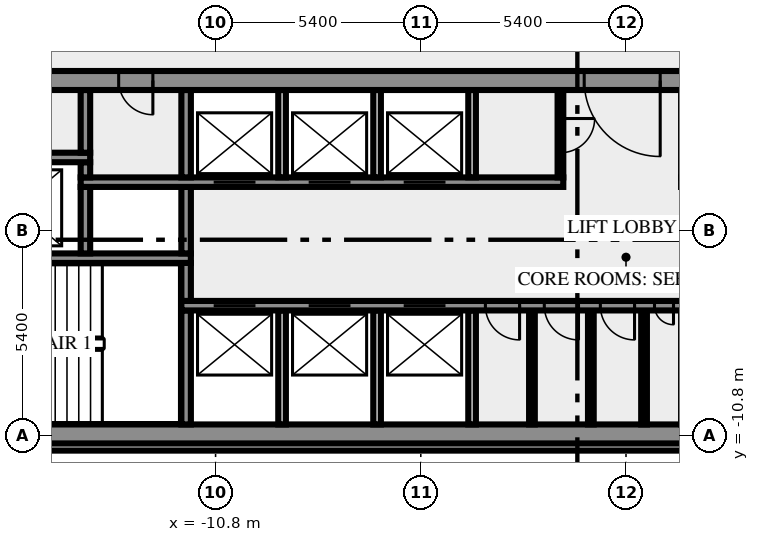
"""IFC4 building model, lengths in metres.
Left out: names, types, materials, properties, quantities, classifications, styles, units other than length and angle.
Written with IfcOpenShell. Run it as: python <this file> out.ifc"""

import sys

from ifc_helpers import new_model, si_unit, direction, frame, frame_2d, origin, place, context, subcontext, project, spatial, rectangle, extrude, element, fill, save


model = new_model("IFC4")
c1 = context("Model", 3, precision=1e-05, world=origin(), true_north=direction((0.0, 1.0)))
c2 = subcontext(c1, "Body", "Model", "MODEL_VIEW")
j1 = project(units=[si_unit("LENGTHUNIT", "METRE"), si_unit("PLANEANGLEUNIT", "RADIAN")], contexts=[c1])
p1 = place(None, origin())
s1 = spatial("IfcSite", under=j1, at=p1, CompositionType="ELEMENT")
p2 = place(p1, origin())
s2 = spatial("IfcBuilding", under=s1, at=p2, CompositionType="ELEMENT")
p3 = place(p2, frame((0.0, 0.0, 63.0)))
s3 = spatial("IfcBuildingStorey", under=s2, at=p3, CompositionType="ELEMENT", Elevation=63.0)
p4 = place(p3, frame((-17.444, -11.088, 0.0), z_axis=(0.0, 0.0, 1.0), x_axis=(1.0, 0.0, 0.0)))
e1 = element("IfcWall", 1, at=p4, inside=s3, PredefinedType="SOLIDWALL", context=c2, shape_type="SweptSolid", body=[
    extrude(rectangle(XDim=34.888, YDim=0.2, at=frame_2d((17.444, 0.0))), origin(), (0.0, 0.0, 1.0), 3.65),
])
p5 = place(p3, frame((-20.0, -10.75, 0.0), z_axis=(0.0, 0.0, 1.0), x_axis=(1.0, 0.0, 0.0)))
e2 = element("IfcWall", 2, at=p5, inside=s3, PredefinedType="SHEAR", context=c2, shape_type="SweptSolid", body=[
    extrude(rectangle(XDim=40.0, YDim=0.5, at=frame_2d((20.0, 0.0))), origin(), (0.0, 0.0, 1.0), 3.65),
])
p6 = place(p5, frame((0.8, 0.0, 1.0)))
e3 = element("IfcOpeningElement", 3, at=p6, cuts=e2, PredefinedType="OPENING", context=c2, shape_type="SweptSolid", body=[
    extrude(rectangle(XDim=1.2, YDim=1.2, at=frame_2d((0.6, 0.6))), frame((0.0, 0.26, 0.0), z_axis=(0.0, -1.0, 0.0), x_axis=(1.0, 0.0, 0.0)), (0.0, 0.0, 1.0), 0.52),
])
p7 = place(p5, frame((38.0, 0.0, 1.0)))
e4 = element("IfcOpeningElement", 4, at=p7, cuts=e2, PredefinedType="OPENING", context=c2, shape_type="SweptSolid", body=[
    extrude(rectangle(XDim=1.2, YDim=1.2, at=frame_2d((0.6, 0.6))), frame((0.0, 0.26, 0.0), z_axis=(0.0, -1.0, 0.0), x_axis=(1.0, 0.0, 0.0)), (0.0, 0.0, 1.0), 0.52),
])
p8 = place(p3, frame((-11.575, -10.5, 0.0), z_axis=(0.0, 0.0, 1.0), x_axis=(0.0, 1.0, 0.0)))
e5 = element("IfcWall", 5, at=p8, inside=s3, PredefinedType="SHEAR", context=c2, shape_type="SweptSolid", body=[
    extrude(rectangle(XDim=3.0, YDim=0.25, at=frame_2d((1.5, 0.0))), origin(), (0.0, 0.0, 1.0), 3.65),
])
for number, where, z_axis, x_axis in (
    (6, (-9.05, -10.5, 0.0), (0.0, 0.0, 1.0), (0.0, 1.0, 0.0)),
    (7, (-6.55, -10.5, 0.0), (0.0, 0.0, 1.0), (0.0, 1.0, 0.0)),
    (8, (-4.05, -10.5, 0.0), (0.0, 0.0, 1.0), (0.0, 1.0, 0.0)),
):
    element("IfcWall", number, at=place(p3, frame(where, z_axis=z_axis, x_axis=x_axis)), inside=s3, PredefinedType="SOLIDWALL", context=c2, shape_type="SweptSolid", body=[
        extrude(rectangle(XDim=3.0, YDim=0.2, at=frame_2d((1.5, 0.0))), origin(), (0.0, 0.0, 1.0), 3.65),
    ])
for number, where, z_axis, x_axis in (
    (9, (-2.475, -10.5, 0.0), (0.0, 0.0, 1.0), (0.0, 1.0, 0.0)),
    (10, (-0.925, -10.5, 0.0), (0.0, 0.0, 1.0), (0.0, 1.0, 0.0)),
    (11, (0.475, -10.5, 0.0), (0.0, 0.0, 1.0), (0.0, 1.0, 0.0)),
):
    element("IfcWall", number, at=place(p3, frame(where, z_axis=z_axis, x_axis=x_axis)), inside=s3, PredefinedType="PARTITIONING", context=c2, shape_type="SweptSolid", body=[
        extrude(rectangle(XDim=3.0, YDim=0.15, at=frame_2d((1.5, 0.0))), origin(), (0.0, 0.0, 1.0), 3.65),
    ])
p9 = place(p3, frame((11.7, -7.375, 0.0), z_axis=(0.0, 0.0, 1.0), x_axis=(-1.0, 0.0, 0.0)))
e12 = element("IfcWall", 12, at=p9, inside=s3, PredefinedType="SHEAR", context=c2, shape_type="SweptSolid", body=[
    extrude(rectangle(XDim=23.4, YDim=0.25, at=frame_2d((11.7, 0.0))), origin(), (0.0, 0.0, 1.0), 3.65),
])
p10 = place(p9, frame((21.45, 0.0, 0.0)))
e13 = element("IfcOpeningElement", 13, at=p10, cuts=e12, PredefinedType="OPENING", context=c2, shape_type="SweptSolid", body=[
    extrude(rectangle(XDim=1.1, YDim=2.1, at=frame_2d((0.55, 1.05))), frame((0.0, 0.135, 0.0), z_axis=(0.0, -1.0, 0.0), x_axis=(1.0, 0.0, 0.0)), (0.0, 0.0, 1.0), 0.27),
])
p11 = place(p9, frame((18.95, 0.0, 0.0)))
e14 = element("IfcOpeningElement", 14, at=p11, cuts=e12, PredefinedType="OPENING", context=c2, shape_type="SweptSolid", body=[
    extrude(rectangle(XDim=1.1, YDim=2.1, at=frame_2d((0.55, 1.05))), frame((0.0, 0.135, 0.0), z_axis=(0.0, -1.0, 0.0), x_axis=(1.0, 0.0, 0.0)), (0.0, 0.0, 1.0), 0.27),
])
p12 = place(p9, frame((16.45, 0.0, 0.0)))
e15 = element("IfcOpeningElement", 15, at=p12, cuts=e12, PredefinedType="OPENING", context=c2, shape_type="SweptSolid", body=[
    extrude(rectangle(XDim=1.1, YDim=2.1, at=frame_2d((0.55, 1.05))), frame((0.0, 0.135, 0.0), z_axis=(0.0, -1.0, 0.0), x_axis=(1.0, 0.0, 0.0)), (0.0, 0.0, 1.0), 0.27),
])
p13 = place(p9, frame((14.5, 0.0, 0.0)))
e16 = element("IfcOpeningElement", 16, at=p13, cuts=e12, PredefinedType="OPENING", context=c2, shape_type="SweptSolid", body=[
    extrude(rectangle(XDim=0.9, YDim=2.1, at=frame_2d((0.45, 1.05))), frame((0.0, 0.135, 0.0), z_axis=(0.0, -1.0, 0.0), x_axis=(1.0, 0.0, 0.0)), (0.0, 0.0, 1.0), 0.27),
])
p14 = place(p9, frame((12.95, 0.0, 0.0)))
e17 = element("IfcOpeningElement", 17, at=p14, cuts=e12, PredefinedType="OPENING", context=c2, shape_type="SweptSolid", body=[
    extrude(rectangle(XDim=0.9, YDim=2.1, at=frame_2d((0.45, 1.05))), frame((0.0, 0.135, 0.0), z_axis=(0.0, -1.0, 0.0), x_axis=(1.0, 0.0, 0.0)), (0.0, 0.0, 1.0), 0.27),
])
p15 = place(p9, frame((11.475, 0.0, 0.0)))
e18 = element("IfcOpeningElement", 18, at=p15, cuts=e12, PredefinedType="OPENING", context=c2, shape_type="SweptSolid", body=[
    extrude(rectangle(XDim=0.9, YDim=2.1, at=frame_2d((0.45, 1.05))), frame((0.0, 0.135, 0.0), z_axis=(0.0, -1.0, 0.0), x_axis=(1.0, 0.0, 0.0)), (0.0, 0.0, 1.0), 0.27),
])
p16 = place(p9, frame((10.45, 0.0, 0.0)))
e19 = element("IfcOpeningElement", 19, at=p16, cuts=e12, PredefinedType="OPENING", context=c2, shape_type="SweptSolid", body=[
    extrude(rectangle(XDim=0.5, YDim=2.1, at=frame_2d((0.25, 1.05))), frame((0.0, 0.135, 0.0), z_axis=(0.0, -1.0, 0.0), x_axis=(1.0, 0.0, 0.0)), (0.0, 0.0, 1.0), 0.27),
])
p17 = place(p3, frame((-11.575, -7.25, 0.0), z_axis=(0.0, 0.0, 1.0), x_axis=(0.0, 1.0, 0.0)))
e20 = element("IfcWall", 20, at=p17, inside=s3, PredefinedType="SHEAR", context=c2, shape_type="SweptSolid", body=[
    extrude(rectangle(XDim=1.0, YDim=0.25, at=frame_2d((0.5, 0.0))), origin(), (0.0, 0.0, 1.0), 3.65),
])
p18 = place(p3, frame((-11.45, -6.125, 0.0), z_axis=(0.0, 0.0, 1.0), x_axis=(-1.0, 0.0, 0.0)))
e21 = element("IfcWall", 21, at=p18, inside=s3, PredefinedType="SHEAR", context=c2, shape_type="SweptSolid", body=[
    extrude(rectangle(XDim=8.05, YDim=0.25, at=frame_2d((4.025, 0.0))), origin(), (0.0, 0.0, 1.0), 3.65),
])
p19 = place(p18, frame((6.2, 0.0, 0.0)))
e22 = element("IfcOpeningElement", 22, at=p19, cuts=e21, PredefinedType="OPENING", context=c2, shape_type="SweptSolid", body=[
    extrude(rectangle(XDim=1.8, YDim=2.1, at=frame_2d((0.9, 1.05))), frame((0.0, 0.135, 0.0), z_axis=(0.0, -1.0, 0.0), x_axis=(1.0, 0.0, 0.0)), (0.0, 0.0, 1.0), 0.27),
])
for number, where, z_axis, x_axis in (
    (23, (-14.225, -6.0, 0.0), (0.0, 0.0, 1.0), (0.0, 1.0, 0.0)),
    (24, (-11.575, -6.0, 0.0), (0.0, 0.0, 1.0), (0.0, 1.0, 0.0)),
):
    element("IfcWall", number, at=place(p3, frame(where, z_axis=z_axis, x_axis=x_axis)), inside=s3, PredefinedType="SHEAR", context=c2, shape_type="SweptSolid", body=[
        extrude(rectangle(XDim=1.75, YDim=0.25, at=frame_2d((0.875, 0.0))), origin(), (0.0, 0.0, 1.0), 3.65),
    ])
p20 = place(p3, frame((-14.35, -4.125, 0.0), z_axis=(0.0, 0.0, 1.0), x_axis=(1.0, 0.0, 0.0)))
e25 = element("IfcWall", 25, at=p20, inside=s3, PredefinedType="SHEAR", context=c2, shape_type="SweptSolid", body=[
    extrude(rectangle(XDim=12.7, YDim=0.25, at=frame_2d((6.35, 0.0))), origin(), (0.0, 0.0, 1.0), 3.65),
])
p21 = place(p20, frame((3.5, 0.0, 0.0)))
e26 = element("IfcOpeningElement", 26, at=p21, cuts=e25, PredefinedType="OPENING", context=c2, shape_type="SweptSolid", body=[
    extrude(rectangle(XDim=1.1, YDim=2.1, at=frame_2d((0.55, 1.05))), frame((0.0, 0.135, 0.0), z_axis=(0.0, -1.0, 0.0), x_axis=(1.0, 0.0, 0.0)), (0.0, 0.0, 1.0), 0.27),
])
p22 = place(p20, frame((6.0, 0.0, 0.0)))
e27 = element("IfcOpeningElement", 27, at=p22, cuts=e25, PredefinedType="OPENING", context=c2, shape_type="SweptSolid", body=[
    extrude(rectangle(XDim=1.1, YDim=2.1, at=frame_2d((0.55, 1.05))), frame((0.0, 0.135, 0.0), z_axis=(0.0, -1.0, 0.0), x_axis=(1.0, 0.0, 0.0)), (0.0, 0.0, 1.0), 0.27),
])
p23 = place(p20, frame((8.5, 0.0, 0.0)))
e28 = element("IfcOpeningElement", 28, at=p23, cuts=e25, PredefinedType="OPENING", context=c2, shape_type="SweptSolid", body=[
    extrude(rectangle(XDim=1.1, YDim=2.1, at=frame_2d((0.55, 1.05))), frame((0.0, 0.135, 0.0), z_axis=(0.0, -1.0, 0.0), x_axis=(1.0, 0.0, 0.0)), (0.0, 0.0, 1.0), 0.27),
])
p24 = place(p3, frame((-14.225, -4.0, 0.0), z_axis=(0.0, 0.0, 1.0), x_axis=(0.0, 1.0, 0.0)))
e29 = element("IfcWall", 29, at=p24, inside=s3, PredefinedType="SHEAR", context=c2, shape_type="SweptSolid", body=[
    extrude(rectangle(XDim=0.4, YDim=0.25, at=frame_2d((0.2, 0.0))), origin(), (0.0, 0.0, 1.0), 3.65),
])
p25 = place(p3, frame((-11.575, -4.0, 0.0), z_axis=(0.0, 0.0, 1.0), x_axis=(0.0, 1.0, 0.0)))
e30 = element("IfcWall", 30, at=p25, inside=s3, PredefinedType="SHEAR", context=c2, shape_type="SweptSolid", body=[
    extrude(rectangle(XDim=2.3, YDim=0.25, at=frame_2d((1.15, 0.0))), origin(), (0.0, 0.0, 1.0), 3.65),
])
for number, where, z_axis, x_axis in (
    (31, (-9.05, -4.0, 0.0), (0.0, 0.0, 1.0), (0.0, 1.0, 0.0)),
    (32, (-6.55, -4.0, 0.0), (0.0, 0.0, 1.0), (0.0, 1.0, 0.0)),
    (33, (-4.05, -4.0, 0.0), (0.0, 0.0, 1.0), (0.0, 1.0, 0.0)),
):
    element("IfcWall", number, at=place(p3, frame(where, z_axis=z_axis, x_axis=x_axis)), inside=s3, PredefinedType="SOLIDWALL", context=c2, shape_type="SweptSolid", body=[
        extrude(rectangle(XDim=2.3, YDim=0.2, at=frame_2d((1.15, 0.0))), origin(), (0.0, 0.0, 1.0), 3.65),
    ])
p26 = place(p3, frame((-1.725, -1.7, 0.0), z_axis=(0.0, 0.0, 1.0), x_axis=(0.0, -1.0, 0.0)))
e34 = element("IfcWall", 34, at=p26, inside=s3, PredefinedType="PARTITIONING", context=c2, shape_type="SweptSolid", body=[
    extrude(rectangle(XDim=2.3, YDim=0.15, at=frame_2d((1.15, 0.0))), origin(), (0.0, 0.0, 1.0), 3.65),
])
p27 = place(p26, frame((0.75, 0.0, 0.0)))
e35 = element("IfcOpeningElement", 35, at=p27, cuts=e34, PredefinedType="OPENING", context=c2, shape_type="SweptSolid", body=[
    extrude(rectangle(XDim=0.9, YDim=2.1, at=frame_2d((0.45, 1.05))), frame((0.0, 0.085, 0.0), z_axis=(0.0, -1.0, 0.0), x_axis=(1.0, 0.0, 0.0)), (0.0, 0.0, 1.0), 0.17),
])
p28 = place(p3, frame((-17.35, -3.475, 0.0), z_axis=(0.0, 0.0, 1.0), x_axis=(1.0, 0.0, 0.0)))
e36 = element("IfcWall", 36, at=p28, inside=s3, PredefinedType="SHEAR", context=c2, shape_type="SweptSolid", body=[
    extrude(rectangle(XDim=3.25, YDim=0.25, at=frame_2d((1.625, 0.0))), origin(), (0.0, 0.0, 1.0), 3.65),
])
p29 = place(p3, frame((-14.225, -3.35, 0.0), z_axis=(0.0, 0.0, 1.0), x_axis=(0.0, 1.0, 0.0)))
e37 = element("IfcWall", 37, at=p29, inside=s3, PredefinedType="SHEAR", context=c2, shape_type="SweptSolid", body=[
    extrude(rectangle(XDim=1.65, YDim=0.25, at=frame_2d((0.825, 0.0))), origin(), (0.0, 0.0, 1.0), 3.65),
])
p30 = place(p3, frame((20.49, -1.45, 0.0), z_axis=(0.0, 0.0, 1.0), x_axis=(-1.0, 0.0, 0.0)))
e38 = element("IfcWall", 38, at=p30, inside=s3, PredefinedType="SHEAR", context=c2, shape_type="SweptSolid", body=[
    extrude(rectangle(XDim=40.98, YDim=0.5, at=frame_2d((20.49, 0.0))), origin(), (0.0, 0.0, 1.0), 3.65),
])
p31 = place(p30, frame((38.14, 0.0, 0.0)))
e39 = element("IfcOpeningElement", 39, at=p31, cuts=e38, PredefinedType="OPENING", context=c2, shape_type="SweptSolid", body=[
    extrude(rectangle(XDim=1.8, YDim=2.1, at=frame_2d((0.9, 1.05))), frame((0.0, 0.26, 0.0), z_axis=(0.0, -1.0, 0.0), x_axis=(1.0, 0.0, 0.0)), (0.0, 0.0, 1.0), 0.52),
])
p32 = place(p30, frame((35.89, 0.0, 0.0)))
e40 = element("IfcOpeningElement", 40, at=p32, cuts=e38, PredefinedType="OPENING", context=c2, shape_type="SweptSolid", body=[
    extrude(rectangle(XDim=0.9, YDim=2.1, at=frame_2d((0.45, 1.05))), frame((0.0, 0.26, 0.0), z_axis=(0.0, -1.0, 0.0), x_axis=(1.0, 0.0, 0.0)), (0.0, 0.0, 1.0), 0.52),
])
p33 = place(p30, frame((32.94, 0.0, 0.0)))
e41 = element("IfcOpeningElement", 41, at=p33, cuts=e38, PredefinedType="OPENING", context=c2, shape_type="SweptSolid", body=[
    extrude(rectangle(XDim=0.9, YDim=2.1, at=frame_2d((0.45, 1.05))), frame((0.0, 0.26, 0.0), z_axis=(0.0, -1.0, 0.0), x_axis=(1.0, 0.0, 0.0)), (0.0, 0.0, 1.0), 0.52),
])
p34 = place(p30, frame((19.59, 0.0, 0.0)))
e42 = element("IfcOpeningElement", 42, at=p34, cuts=e38, PredefinedType="OPENING", context=c2, shape_type="SweptSolid", body=[
    extrude(rectangle(XDim=2.0, YDim=2.1, at=frame_2d((1.0, 1.05))), frame((0.0, 0.26, 0.0), z_axis=(0.0, -1.0, 0.0), x_axis=(1.0, 0.0, 0.0)), (0.0, 0.0, 1.0), 0.52),
])
p35 = place(p30, frame((7.14, 0.0, 0.0)))
e43 = element("IfcOpeningElement", 43, at=p35, cuts=e38, PredefinedType="OPENING", context=c2, shape_type="SweptSolid", body=[
    extrude(rectangle(XDim=0.9, YDim=2.1, at=frame_2d((0.45, 1.05))), frame((0.0, 0.26, 0.0), z_axis=(0.0, -1.0, 0.0), x_axis=(1.0, 0.0, 0.0)), (0.0, 0.0, 1.0), 0.52),
])
p36 = place(p30, frame((5.028, 0.0, 0.0)))
e44 = element("IfcOpeningElement", 44, at=p36, cuts=e38, PredefinedType="OPENING", context=c2, shape_type="SweptSolid", body=[
    extrude(rectangle(XDim=0.8, YDim=2.1, at=frame_2d((0.4, 1.05))), frame((0.0, 0.26, 0.0), z_axis=(0.0, -1.0, 0.0), x_axis=(1.0, 0.0, 0.0)), (0.0, 0.0, 1.0), 0.52),
])
p37 = place(p30, frame((3.452, 0.0, 0.0)))
e45 = element("IfcOpeningElement", 45, at=p37, cuts=e38, PredefinedType="OPENING", context=c2, shape_type="SweptSolid", body=[
    extrude(rectangle(XDim=0.8, YDim=2.1, at=frame_2d((0.4, 1.05))), frame((0.0, 0.26, 0.0), z_axis=(0.0, -1.0, 0.0), x_axis=(1.0, 0.0, 0.0)), (0.0, 0.0, 1.0), 0.52),
])
p38 = place(p30, frame((1.04, 0.0, 0.0)))
e46 = element("IfcOpeningElement", 46, at=p38, cuts=e38, PredefinedType="OPENING", context=c2, shape_type="SweptSolid", body=[
    extrude(rectangle(XDim=1.8, YDim=2.1, at=frame_2d((0.9, 1.05))), frame((0.0, 0.26, 0.0), z_axis=(0.0, -1.0, 0.0), x_axis=(1.0, 0.0, 0.0)), (0.0, 0.0, 1.0), 0.52),
])
p39 = place(p10, origin())
e47 = element("IfcDoor", 47, at=p39, inside=s3, OperationType="DOUBLE_DOOR_SLIDING", PredefinedType="DOOR", context=c2, shape_type="SweptSolid", body=[
    extrude(rectangle(XDim=1.1, YDim=2.1, at=frame_2d((0.55, 1.05))), frame((0.0, 0.025, 0.0), z_axis=(0.0, -1.0, 0.0), x_axis=(1.0, 0.0, 0.0)), (0.0, 0.0, 1.0), 0.05),
])
fill(e13, e47)
p40 = place(p11, origin())
e48 = element("IfcDoor", 48, at=p40, inside=s3, OperationType="DOUBLE_DOOR_SLIDING", PredefinedType="DOOR", context=c2, shape_type="SweptSolid", body=[
    extrude(rectangle(XDim=1.1, YDim=2.1, at=frame_2d((0.55, 1.05))), frame((0.0, 0.025, 0.0), z_axis=(0.0, -1.0, 0.0), x_axis=(1.0, 0.0, 0.0)), (0.0, 0.0, 1.0), 0.05),
])
fill(e14, e48)
p41 = place(p12, origin())
e49 = element("IfcDoor", 49, at=p41, inside=s3, OperationType="DOUBLE_DOOR_SLIDING", PredefinedType="DOOR", context=c2, shape_type="SweptSolid", body=[
    extrude(rectangle(XDim=1.1, YDim=2.1, at=frame_2d((0.55, 1.05))), frame((0.0, 0.025, 0.0), z_axis=(0.0, -1.0, 0.0), x_axis=(1.0, 0.0, 0.0)), (0.0, 0.0, 1.0), 0.05),
])
fill(e15, e49)
p42 = place(p13, origin())
e50 = element("IfcDoor", 50, at=p42, inside=s3, OperationType="SINGLE_SWING_RIGHT", PredefinedType="DOOR", context=c2, shape_type="SweptSolid", body=[
    extrude(rectangle(XDim=0.9, YDim=2.1, at=frame_2d((0.45, 1.05))), frame((0.0, 0.025, 0.0), z_axis=(0.0, -1.0, 0.0), x_axis=(1.0, 0.0, 0.0)), (0.0, 0.0, 1.0), 0.05),
])
fill(e16, e50)
p43 = place(p14, origin())
e51 = element("IfcDoor", 51, at=p43, inside=s3, OperationType="SINGLE_SWING_RIGHT", PredefinedType="DOOR", context=c2, shape_type="SweptSolid", body=[
    extrude(rectangle(XDim=0.9, YDim=2.1, at=frame_2d((0.45, 1.05))), frame((0.0, 0.025, 0.0), z_axis=(0.0, -1.0, 0.0), x_axis=(1.0, 0.0, 0.0)), (0.0, 0.0, 1.0), 0.05),
])
fill(e17, e51)
p44 = place(p15, origin())
e52 = element("IfcDoor", 52, at=p44, inside=s3, OperationType="SINGLE_SWING_RIGHT", PredefinedType="DOOR", context=c2, shape_type="SweptSolid", body=[
    extrude(rectangle(XDim=0.9, YDim=2.1, at=frame_2d((0.45, 1.05))), frame((0.0, 0.025, 0.0), z_axis=(0.0, -1.0, 0.0), x_axis=(1.0, 0.0, 0.0)), (0.0, 0.0, 1.0), 0.05),
])
fill(e18, e52)
p45 = place(p16, origin())
e53 = element("IfcDoor", 53, at=p45, inside=s3, OperationType="SINGLE_SWING_LEFT", PredefinedType="DOOR", context=c2, shape_type="SweptSolid", body=[
    extrude(rectangle(XDim=0.5, YDim=2.1, at=frame_2d((0.25, 1.05))), frame((0.0, 0.025, 0.0), z_axis=(0.0, -1.0, 0.0), x_axis=(1.0, 0.0, 0.0)), (0.0, 0.0, 1.0), 0.05),
])
fill(e19, e53)
p46 = place(p21, origin())
e54 = element("IfcDoor", 54, at=p46, inside=s3, OperationType="DOUBLE_DOOR_SLIDING", PredefinedType="DOOR", context=c2, shape_type="SweptSolid", body=[
    extrude(rectangle(XDim=1.1, YDim=2.1, at=frame_2d((0.55, 1.05))), frame((0.0, 0.025, 0.0), z_axis=(0.0, -1.0, 0.0), x_axis=(1.0, 0.0, 0.0)), (0.0, 0.0, 1.0), 0.05),
])
fill(e26, e54)
p47 = place(p22, origin())
e55 = element("IfcDoor", 55, at=p47, inside=s3, OperationType="DOUBLE_DOOR_SLIDING", PredefinedType="DOOR", context=c2, shape_type="SweptSolid", body=[
    extrude(rectangle(XDim=1.1, YDim=2.1, at=frame_2d((0.55, 1.05))), frame((0.0, 0.025, 0.0), z_axis=(0.0, -1.0, 0.0), x_axis=(1.0, 0.0, 0.0)), (0.0, 0.0, 1.0), 0.05),
])
fill(e27, e55)
p48 = place(p23, origin())
e56 = element("IfcDoor", 56, at=p48, inside=s3, OperationType="DOUBLE_DOOR_SLIDING", PredefinedType="DOOR", context=c2, shape_type="SweptSolid", body=[
    extrude(rectangle(XDim=1.1, YDim=2.1, at=frame_2d((0.55, 1.05))), frame((0.0, 0.025, 0.0), z_axis=(0.0, -1.0, 0.0), x_axis=(1.0, 0.0, 0.0)), (0.0, 0.0, 1.0), 0.05),
])
fill(e28, e56)
p49 = place(p27, origin())
e57 = element("IfcDoor", 57, at=p49, inside=s3, OperationType="SINGLE_SWING_RIGHT", PredefinedType="DOOR", context=c2, shape_type="SweptSolid", body=[
    extrude(rectangle(XDim=0.9, YDim=2.1, at=frame_2d((0.45, 1.05))), frame((0.0, 0.025, 0.0), z_axis=(0.0, -1.0, 0.0), x_axis=(1.0, 0.0, 0.0)), (0.0, 0.0, 1.0), 0.05),
])
fill(e35, e57)
p50 = place(p33, origin())
e58 = element("IfcDoor", 58, at=p50, inside=s3, OperationType="SINGLE_SWING_RIGHT", PredefinedType="DOOR", context=c2, shape_type="SweptSolid", body=[
    extrude(rectangle(XDim=0.9, YDim=2.1, at=frame_2d((0.45, 1.05))), frame((0.0, 0.025, 0.0), z_axis=(0.0, -1.0, 0.0), x_axis=(1.0, 0.0, 0.0)), (0.0, 0.0, 1.0), 0.05),
])
fill(e41, e58)
p51 = place(p34, origin())
e59 = element("IfcDoor", 59, at=p51, inside=s3, OperationType="DOUBLE_DOOR_SINGLE_SWING", PredefinedType="DOOR", context=c2, shape_type="SweptSolid", body=[
    extrude(rectangle(XDim=2.0, YDim=2.1, at=frame_2d((1.0, 1.05))), frame((0.0, 0.025, 0.0), z_axis=(0.0, -1.0, 0.0), x_axis=(1.0, 0.0, 0.0)), (0.0, 0.0, 1.0), 0.05),
])
fill(e42, e59)
save(model, sys.argv[1])
